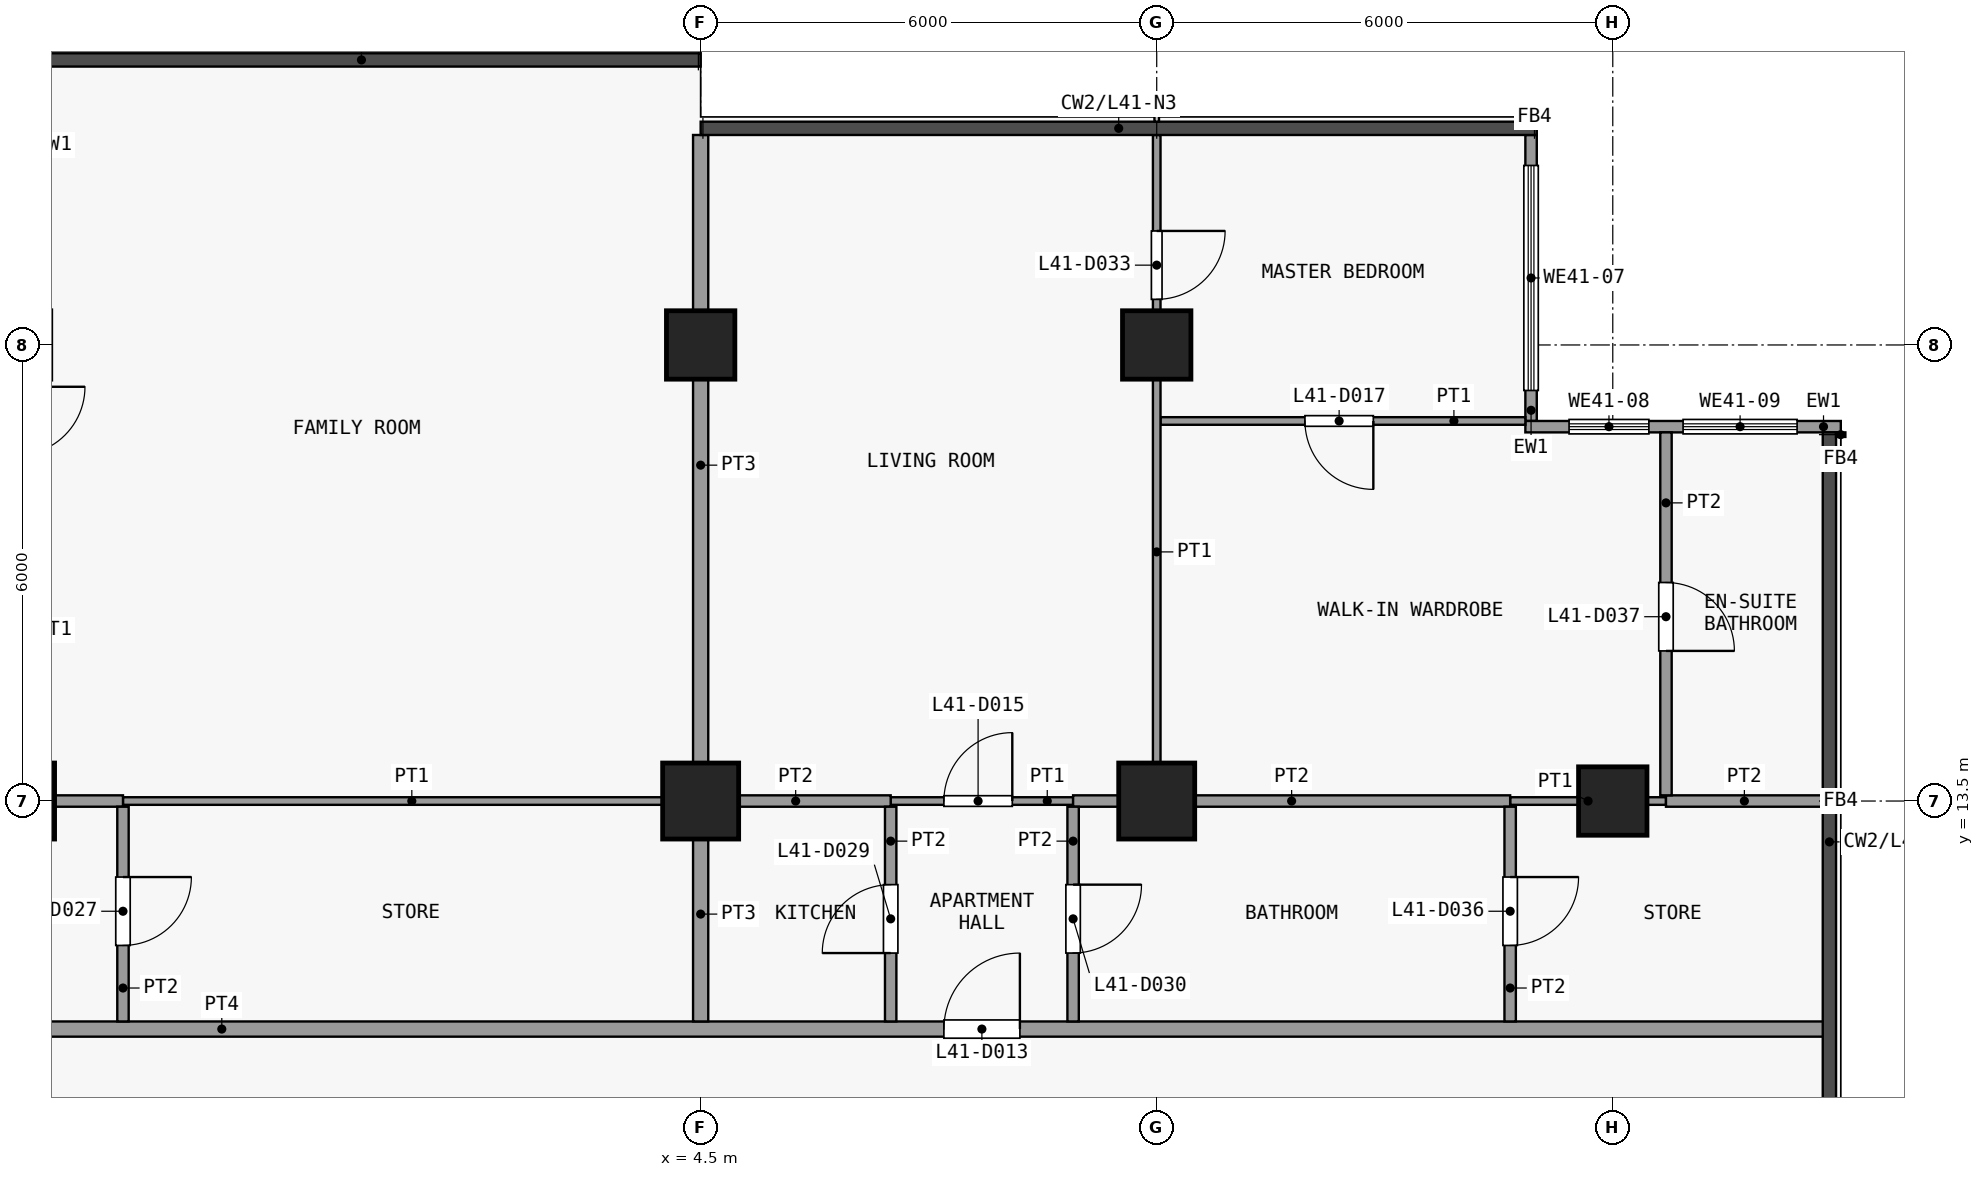
"""IFC4 building model, lengths in metres.
Left out: names, types, materials, properties, quantities, classifications, styles, units other than length and angle.
Written with IfcOpenShell. Run it as: python <this file> out.ifc"""

import sys

from ifc_helpers import new_model, si_unit, direction, frame, frame_2d, origin, origin_2d, place, context, subcontext, project, spatial, rectangle, extrude, element, fill, save


model = new_model("IFC4")
c1 = context("Model", 3, precision=1e-05, world=origin(), true_north=direction((0.0, 1.0)))
c2 = subcontext(c1, "Body", "Model", "MODEL_VIEW")
j1 = project(units=[si_unit("LENGTHUNIT", "METRE"), si_unit("PLANEANGLEUNIT", "RADIAN")], contexts=[c1])
p1 = place(None, origin())
s1 = spatial("IfcSite", under=j1, at=p1, CompositionType="ELEMENT")
p2 = place(p1, origin())
s2 = spatial("IfcBuilding", under=s1, at=p2, CompositionType="ELEMENT")
p3 = place(p2, frame((0.0, 0.0, 167.3)))
s3 = spatial("IfcBuildingStorey", under=s2, at=p3, CompositionType="ELEMENT", Elevation=167.3)
for number, where, z_axis, x_axis in (
    (1, (-4.5, 13.5, 0.0), (0.0, 0.0, 1.0), (1.0, 0.0, 0.0)),
    (2, (4.5, 13.5, 0.0), (0.0, 0.0, 1.0), (1.0, 0.0, 0.0)),
):
    element("IfcColumn", number, at=place(p3, frame(where, z_axis=z_axis, x_axis=x_axis)), inside=s3, PredefinedType="COLUMN", context=c2, shape_type="SweptSolid", body=[
        extrude(rectangle(XDim=1.0, YDim=1.0, at=origin_2d()), origin(), (0.0, 0.0, 1.0), 3.6),
    ])
p4 = place(p3, frame((4.5, 19.5, 0.0), z_axis=(0.0, 0.0, 1.0), x_axis=(1.0, 0.0, 0.0)))
e3 = element("IfcColumn", 3, at=p4, inside=s3, PredefinedType="COLUMN", context=c2, shape_type="SweptSolid", body=[
    extrude(rectangle(XDim=0.9, YDim=0.9, at=origin_2d()), origin(), (0.0, 0.0, 1.0), 3.6),
])
p5 = place(p3, frame((10.5, 13.5, 0.0), z_axis=(0.0, 0.0, 1.0), x_axis=(1.0, 0.0, 0.0)))
e4 = element("IfcColumn", 4, at=p5, inside=s3, PredefinedType="COLUMN", context=c2, shape_type="SweptSolid", body=[
    extrude(rectangle(XDim=1.0, YDim=1.0, at=origin_2d()), origin(), (0.0, 0.0, 1.0), 3.6),
])
for number, where, z_axis, x_axis in (
    (5, (10.5, 19.5, 0.0), (0.0, 0.0, 1.0), (1.0, 0.0, 0.0)),
    (6, (16.5, 13.5, 0.0), (0.0, 0.0, 1.0), (1.0, 0.0, 0.0)),
):
    element("IfcColumn", number, at=place(p3, frame(where, z_axis=z_axis, x_axis=x_axis)), inside=s3, PredefinedType="COLUMN", context=c2, shape_type="SweptSolid", body=[
        extrude(rectangle(XDim=0.9, YDim=0.9, at=origin_2d()), origin(), (0.0, 0.0, 1.0), 3.6),
    ])
p6 = place(p3, frame((15.425, 22.262, 0.0), z_axis=(0.0, 0.0, 1.0), x_axis=(0.0, -1.0, 0.0)))
e7 = element("IfcWall", 7, at=p6, inside=s3, PredefinedType="SOLIDWALL", context=c2, shape_type="SweptSolid", body=[
    extrude(rectangle(XDim=3.762, YDim=0.15, at=frame_2d((1.881, 0.0))), origin(), (0.0, 0.0, 1.0), 3.3),
])
p7 = place(p6, frame((0.401, 0.0, 0.9)))
e8 = element("IfcOpeningElement", 8, at=p7, cuts=e7, PredefinedType="OPENING", context=c2, shape_type="SweptSolid", body=[
    extrude(rectangle(XDim=2.96, YDim=2.4, at=frame_2d((1.48, 1.2))), frame((0.0, 0.085, 0.0), z_axis=(0.0, -1.0, 0.0), x_axis=(1.0, 0.0, 0.0)), (0.0, 0.0, 1.0), 0.17),
])
p8 = place(p3, frame((15.35, 18.425, 0.0), z_axis=(0.0, 0.0, 1.0), x_axis=(1.0, 0.0, 0.0)))
e9 = element("IfcWall", 9, at=p8, inside=s3, PredefinedType="SOLIDWALL", context=c2, shape_type="SweptSolid", body=[
    extrude(rectangle(XDim=4.15, YDim=0.15, at=frame_2d((2.075, 0.0))), origin(), (0.0, 0.0, 1.0), 3.3),
])
p9 = place(p8, frame((0.575, 0.0, 0.9)))
e10 = element("IfcOpeningElement", 10, at=p9, cuts=e9, PredefinedType="OPENING", context=c2, shape_type="SweptSolid", body=[
    extrude(rectangle(XDim=1.05, YDim=2.4, at=frame_2d((0.525, 1.2))), frame((0.0, 0.085, 0.0), z_axis=(0.0, -1.0, 0.0), x_axis=(1.0, 0.0, 0.0)), (0.0, 0.0, 1.0), 0.17),
])
p10 = place(p8, frame((2.075, 0.0, 0.9)))
e11 = element("IfcOpeningElement", 11, at=p10, cuts=e9, PredefinedType="OPENING", context=c2, shape_type="SweptSolid", body=[
    extrude(rectangle(XDim=1.5, YDim=2.4, at=frame_2d((0.75, 1.2))), frame((0.0, 0.085, 0.0), z_axis=(0.0, -1.0, 0.0), x_axis=(1.0, 0.0, 0.0)), (0.0, 0.0, 1.0), 0.17),
])
p11 = place(p3, frame((-17.85, 10.5, 0.0), z_axis=(0.0, 0.0, 1.0), x_axis=(1.0, 0.0, 0.0)))
e12 = element("IfcWall", 12, at=p11, inside=s3, PredefinedType="PARTITIONING", context=c2, shape_type="SweptSolid", body=[
    extrude(rectangle(XDim=37.2, YDim=0.2, at=frame_2d((18.6, 0.0))), origin(), (0.0, 0.0, 1.0), 3.3),
])
p12 = place(p11, frame((5.55, 0.0, 0.0)))
e13 = element("IfcOpeningElement", 13, at=p12, cuts=e12, PredefinedType="OPENING", context=c2, shape_type="SweptSolid", body=[
    extrude(rectangle(XDim=1.0, YDim=2.1, at=frame_2d((0.5, 1.05))), frame((0.0, 0.11, 0.0), z_axis=(0.0, -1.0, 0.0), x_axis=(1.0, 0.0, 0.0)), (0.0, 0.0, 1.0), 0.22),
])
p13 = place(p11, frame((25.55, 0.0, 0.0)))
e14 = element("IfcOpeningElement", 14, at=p13, cuts=e12, PredefinedType="OPENING", context=c2, shape_type="SweptSolid", body=[
    extrude(rectangle(XDim=1.0, YDim=2.1, at=frame_2d((0.5, 1.05))), frame((0.0, 0.11, 0.0), z_axis=(0.0, -1.0, 0.0), x_axis=(1.0, 0.0, 0.0)), (0.0, 0.0, 1.0), 0.22),
])
p14 = place(p3, frame((-3.1, 13.5, 0.0), z_axis=(0.0, 0.0, 1.0), x_axis=(1.0, 0.0, 0.0)))
e15 = element("IfcWall", 15, at=p14, inside=s3, PredefinedType="PARTITIONING", context=c2, shape_type="SweptSolid", body=[
    extrude(rectangle(XDim=7.6, YDim=0.1, at=frame_2d((3.8, 0.0))), origin(), (0.0, 0.0, 1.0), 3.3),
])
p15 = place(p3, frame((7.0, 13.5, 0.0), z_axis=(0.0, 0.0, 1.0), x_axis=(1.0, 0.0, 0.0)))
e16 = element("IfcWall", 16, at=p15, inside=s3, PredefinedType="PARTITIONING", context=c2, shape_type="SweptSolid", body=[
    extrude(rectangle(XDim=2.4, YDim=0.1, at=frame_2d((1.2, 0.0))), origin(), (0.0, 0.0, 1.0), 3.3),
])
p16 = place(p15, frame((0.7, 0.0, 0.0)))
e17 = element("IfcOpeningElement", 17, at=p16, cuts=e16, PredefinedType="OPENING", context=c2, shape_type="SweptSolid", body=[
    extrude(rectangle(XDim=0.9, YDim=2.1, at=frame_2d((0.45, 1.05))), frame((0.0, 0.06, 0.0), z_axis=(0.0, -1.0, 0.0), x_axis=(1.0, 0.0, 0.0)), (0.0, 0.0, 1.0), 0.12),
])
p17 = place(p3, frame((15.15, 13.5, 0.0), z_axis=(0.0, 0.0, 1.0), x_axis=(1.0, 0.0, 0.0)))
e18 = element("IfcWall", 18, at=p17, inside=s3, PredefinedType="PARTITIONING", context=c2, shape_type="SweptSolid", body=[
    extrude(rectangle(XDim=2.05, YDim=0.1, at=frame_2d((1.025, 0.0))), origin(), (0.0, 0.0, 1.0), 3.3),
])
p18 = place(p3, frame((-10.5, 13.5, 0.0), z_axis=(0.0, 0.0, 1.0), x_axis=(1.0, 0.0, 0.0)))
e19 = element("IfcWall", 19, at=p18, inside=s3, PredefinedType="PARTITIONING", context=c2, shape_type="SweptSolid", body=[
    extrude(rectangle(XDim=7.4, YDim=0.15, at=frame_2d((3.7, 0.0))), origin(), (0.0, 0.0, 1.0), 3.3),
])
p19 = place(p3, frame((4.5, 13.5, 0.0), z_axis=(0.0, 0.0, 1.0), x_axis=(1.0, 0.0, 0.0)))
e20 = element("IfcWall", 20, at=p19, inside=s3, PredefinedType="PARTITIONING", context=c2, shape_type="SweptSolid", body=[
    extrude(rectangle(XDim=2.5, YDim=0.15, at=frame_2d((1.25, 0.0))), origin(), (0.0, 0.0, 1.0), 3.3),
])
p20 = place(p3, frame((9.4, 13.5, 0.0), z_axis=(0.0, 0.0, 1.0), x_axis=(1.0, 0.0, 0.0)))
e21 = element("IfcWall", 21, at=p20, inside=s3, PredefinedType="PARTITIONING", context=c2, shape_type="SweptSolid", body=[
    extrude(rectangle(XDim=5.75, YDim=0.15, at=frame_2d((2.875, 0.0))), origin(), (0.0, 0.0, 1.0), 3.3),
])
p21 = place(p3, frame((17.2, 13.5, 0.0), z_axis=(0.0, 0.0, 1.0), x_axis=(1.0, 0.0, 0.0)))
e22 = element("IfcWall", 22, at=p21, inside=s3, PredefinedType="PARTITIONING", context=c2, shape_type="SweptSolid", body=[
    extrude(rectangle(XDim=2.062, YDim=0.15, at=frame_2d((1.031, 0.0))), origin(), (0.0, 0.0, 1.0), 3.3),
])
p22 = place(p3, frame((10.55, 18.5, 0.0), z_axis=(0.0, 0.0, 1.0), x_axis=(1.0, 0.0, 0.0)))
e23 = element("IfcWall", 23, at=p22, inside=s3, PredefinedType="PARTITIONING", context=c2, shape_type="SweptSolid", body=[
    extrude(rectangle(XDim=4.8, YDim=0.1, at=frame_2d((2.4, 0.0))), origin(), (0.0, 0.0, 1.0), 3.3),
])
p23 = place(p22, frame((1.9, 0.0, 0.0)))
e24 = element("IfcOpeningElement", 24, at=p23, cuts=e23, PredefinedType="OPENING", context=c2, shape_type="SweptSolid", body=[
    extrude(rectangle(XDim=0.9, YDim=2.1, at=frame_2d((0.45, 1.05))), frame((0.0, 0.06, 0.0), z_axis=(0.0, -1.0, 0.0), x_axis=(1.0, 0.0, 0.0)), (0.0, 0.0, 1.0), 0.12),
])
p24 = place(p3, frame((-3.1, 10.6, 0.0), z_axis=(0.0, 0.0, 1.0), x_axis=(0.0, 1.0, 0.0)))
e25 = element("IfcWall", 25, at=p24, inside=s3, PredefinedType="PARTITIONING", context=c2, shape_type="SweptSolid", body=[
    extrude(rectangle(XDim=2.825, YDim=0.15, at=frame_2d((1.413, 0.0))), origin(), (0.0, 0.0, 1.0), 3.3),
])
p25 = place(p24, frame((1.0, 0.0, 0.0)))
e26 = element("IfcOpeningElement", 26, at=p25, cuts=e25, PredefinedType="OPENING", context=c2, shape_type="SweptSolid", body=[
    extrude(rectangle(XDim=0.9, YDim=2.1, at=frame_2d((0.45, 1.05))), frame((0.0, 0.085, 0.0), z_axis=(0.0, -1.0, 0.0), x_axis=(1.0, 0.0, 0.0)), (0.0, 0.0, 1.0), 0.17),
])
p26 = place(p3, frame((4.5, 10.6, 0.0), z_axis=(0.0, 0.0, 1.0), x_axis=(0.0, 1.0, 0.0)))
e27 = element("IfcWall", 27, at=p26, inside=s3, PredefinedType="PARTITIONING", context=c2, shape_type="SweptSolid", body=[
    extrude(rectangle(XDim=2.825, YDim=0.2, at=frame_2d((1.413, 0.0))), origin(), (0.0, 0.0, 1.0), 3.3),
])
p27 = place(p3, frame((4.5, 13.575, 0.0), z_axis=(0.0, 0.0, 1.0), x_axis=(0.0, 1.0, 0.0)))
e28 = element("IfcWall", 28, at=p27, inside=s3, PredefinedType="PARTITIONING", context=c2, shape_type="SweptSolid", body=[
    extrude(rectangle(XDim=8.688, YDim=0.2, at=frame_2d((4.344, 0.0))), origin(), (0.0, 0.0, 1.0), 3.3),
])
p28 = place(p3, frame((7.0, 10.6, 0.0), z_axis=(0.0, 0.0, 1.0), x_axis=(0.0, 1.0, 0.0)))
e29 = element("IfcWall", 29, at=p28, inside=s3, PredefinedType="PARTITIONING", context=c2, shape_type="SweptSolid", body=[
    extrude(rectangle(XDim=2.825, YDim=0.15, at=frame_2d((1.413, 0.0))), origin(), (0.0, 0.0, 1.0), 3.3),
])
p29 = place(p28, frame((0.9, 0.0, 0.0)))
e30 = element("IfcOpeningElement", 30, at=p29, cuts=e29, PredefinedType="OPENING", context=c2, shape_type="SweptSolid", body=[
    extrude(rectangle(XDim=0.9, YDim=2.1, at=frame_2d((0.45, 1.05))), frame((0.0, 0.085, 0.0), z_axis=(0.0, -1.0, 0.0), x_axis=(1.0, 0.0, 0.0)), (0.0, 0.0, 1.0), 0.17),
])
p30 = place(p3, frame((9.4, 10.6, 0.0), z_axis=(0.0, 0.0, 1.0), x_axis=(0.0, 1.0, 0.0)))
e31 = element("IfcWall", 31, at=p30, inside=s3, PredefinedType="PARTITIONING", context=c2, shape_type="SweptSolid", body=[
    extrude(rectangle(XDim=2.825, YDim=0.15, at=frame_2d((1.413, 0.0))), origin(), (0.0, 0.0, 1.0), 3.3),
])
p31 = place(p30, frame((0.9, 0.0, 0.0)))
e32 = element("IfcOpeningElement", 32, at=p31, cuts=e31, PredefinedType="OPENING", context=c2, shape_type="SweptSolid", body=[
    extrude(rectangle(XDim=0.9, YDim=2.1, at=frame_2d((0.45, 1.05))), frame((0.0, 0.085, 0.0), z_axis=(0.0, -1.0, 0.0), x_axis=(1.0, 0.0, 0.0)), (0.0, 0.0, 1.0), 0.17),
])
p32 = place(p3, frame((10.5, 13.575, 0.0), z_axis=(0.0, 0.0, 1.0), x_axis=(0.0, 1.0, 0.0)))
e33 = element("IfcWall", 33, at=p32, inside=s3, PredefinedType="PARTITIONING", context=c2, shape_type="SweptSolid", body=[
    extrude(rectangle(XDim=8.688, YDim=0.1, at=frame_2d((4.344, 0.0))), origin(), (0.0, 0.0, 1.0), 3.3),
])
p33 = place(p32, frame((6.525, 0.0, 0.0)))
e34 = element("IfcOpeningElement", 34, at=p33, cuts=e33, PredefinedType="OPENING", context=c2, shape_type="SweptSolid", body=[
    extrude(rectangle(XDim=0.9, YDim=2.1, at=frame_2d((0.45, 1.05))), frame((0.0, 0.06, 0.0), z_axis=(0.0, -1.0, 0.0), x_axis=(1.0, 0.0, 0.0)), (0.0, 0.0, 1.0), 0.12),
])
p34 = place(p3, frame((15.15, 10.6, 0.0), z_axis=(0.0, 0.0, 1.0), x_axis=(0.0, 1.0, 0.0)))
e35 = element("IfcWall", 35, at=p34, inside=s3, PredefinedType="PARTITIONING", context=c2, shape_type="SweptSolid", body=[
    extrude(rectangle(XDim=2.825, YDim=0.15, at=frame_2d((1.413, 0.0))), origin(), (0.0, 0.0, 1.0), 3.3),
])
p35 = place(p34, frame((1.0, 0.0, 0.0)))
e36 = element("IfcOpeningElement", 36, at=p35, cuts=e35, PredefinedType="OPENING", context=c2, shape_type="SweptSolid", body=[
    extrude(rectangle(XDim=0.9, YDim=2.1, at=frame_2d((0.45, 1.05))), frame((0.0, 0.085, 0.0), z_axis=(0.0, -1.0, 0.0), x_axis=(1.0, 0.0, 0.0)), (0.0, 0.0, 1.0), 0.17),
])
p36 = place(p3, frame((17.2, 13.575, 0.0), z_axis=(0.0, 0.0, 1.0), x_axis=(0.0, 1.0, 0.0)))
e37 = element("IfcWall", 37, at=p36, inside=s3, PredefinedType="PARTITIONING", context=c2, shape_type="SweptSolid", body=[
    extrude(rectangle(XDim=4.775, YDim=0.15, at=frame_2d((2.388, 0.0))), origin(), (0.0, 0.0, 1.0), 3.3),
])
p37 = place(p36, frame((1.9, 0.0, 0.0)))
e38 = element("IfcOpeningElement", 38, at=p37, cuts=e37, PredefinedType="OPENING", context=c2, shape_type="SweptSolid", body=[
    extrude(rectangle(XDim=0.9, YDim=2.1, at=frame_2d((0.45, 1.05))), frame((0.0, 0.085, 0.0), z_axis=(0.0, -1.0, 0.0), x_axis=(1.0, 0.0, 0.0)), (0.0, 0.0, 1.0), 0.17),
])
p38 = place(p7, origin())
e39 = element("IfcWindow", 39, at=p38, inside=s3, PartitioningType="SINGLE_PANEL", PredefinedType="WINDOW", context=c2, shape_type="SweptSolid", body=[
    extrude(rectangle(XDim=2.96, YDim=2.4, at=frame_2d((1.48, 1.2))), frame((0.0, 0.03, 0.0), z_axis=(0.0, -1.0, 0.0), x_axis=(1.0, 0.0, 0.0)), (0.0, 0.0, 1.0), 0.06),
])
fill(e8, e39)
p39 = place(p9, origin())
e40 = element("IfcWindow", 40, at=p39, inside=s3, PartitioningType="SINGLE_PANEL", PredefinedType="WINDOW", context=c2, shape_type="SweptSolid", body=[
    extrude(rectangle(XDim=1.05, YDim=2.4, at=frame_2d((0.525, 1.2))), frame((0.0, 0.03, 0.0), z_axis=(0.0, -1.0, 0.0), x_axis=(1.0, 0.0, 0.0)), (0.0, 0.0, 1.0), 0.06),
])
fill(e10, e40)
p40 = place(p10, origin())
e41 = element("IfcWindow", 41, at=p40, inside=s3, PartitioningType="SINGLE_PANEL", PredefinedType="WINDOW", context=c2, shape_type="SweptSolid", body=[
    extrude(rectangle(XDim=1.5, YDim=2.4, at=frame_2d((0.75, 1.2))), frame((0.0, 0.03, 0.0), z_axis=(0.0, -1.0, 0.0), x_axis=(1.0, 0.0, 0.0)), (0.0, 0.0, 1.0), 0.06),
])
fill(e11, e41)
p41 = place(p13, origin())
e42 = element("IfcDoor", 42, at=p41, inside=s3, OperationType="SINGLE_SWING_LEFT", PredefinedType="DOOR", context=c2, shape_type="SweptSolid", body=[
    extrude(rectangle(XDim=1.0, YDim=2.1, at=frame_2d((0.5, 1.05))), frame((0.0, 0.025, 0.0), z_axis=(0.0, -1.0, 0.0), x_axis=(1.0, 0.0, 0.0)), (0.0, 0.0, 1.0), 0.05),
])
fill(e14, e42)
p42 = place(p16, origin())
e43 = element("IfcDoor", 43, at=p42, inside=s3, OperationType="SINGLE_SWING_LEFT", PredefinedType="DOOR", context=c2, shape_type="SweptSolid", body=[
    extrude(rectangle(XDim=0.9, YDim=2.1, at=frame_2d((0.45, 1.05))), frame((0.0, 0.025, 0.0), z_axis=(0.0, -1.0, 0.0), x_axis=(1.0, 0.0, 0.0)), (0.0, 0.0, 1.0), 0.05),
])
fill(e17, e43)
p43 = place(p23, origin())
e44 = element("IfcDoor", 44, at=p43, inside=s3, OperationType="SINGLE_SWING_RIGHT", PredefinedType="DOOR", context=c2, shape_type="SweptSolid", body=[
    extrude(rectangle(XDim=0.9, YDim=2.1, at=frame_2d((0.45, 1.05))), frame((0.0, 0.025, 0.0), z_axis=(0.0, -1.0, 0.0), x_axis=(1.0, 0.0, 0.0)), (0.0, 0.0, 1.0), 0.05),
])
fill(e24, e44)
p44 = place(p25, origin())
e45 = element("IfcDoor", 45, at=p44, inside=s3, OperationType="SINGLE_SWING_RIGHT", PredefinedType="DOOR", context=c2, shape_type="SweptSolid", body=[
    extrude(rectangle(XDim=0.9, YDim=2.1, at=frame_2d((0.45, 1.05))), frame((0.0, 0.025, 0.0), z_axis=(0.0, -1.0, 0.0), x_axis=(1.0, 0.0, 0.0)), (0.0, 0.0, 1.0), 0.05),
])
fill(e26, e45)
p45 = place(p29, origin())
e46 = element("IfcDoor", 46, at=p45, inside=s3, OperationType="SINGLE_SWING_RIGHT", PredefinedType="DOOR", context=c2, shape_type="SweptSolid", body=[
    extrude(rectangle(XDim=0.9, YDim=2.1, at=frame_2d((0.45, 1.05))), frame((0.0, 0.025, 0.0), z_axis=(0.0, -1.0, 0.0), x_axis=(1.0, 0.0, 0.0)), (0.0, 0.0, 1.0), 0.05),
])
fill(e30, e46)
p46 = place(p31, origin())
e47 = element("IfcDoor", 47, at=p46, inside=s3, OperationType="SINGLE_SWING_RIGHT", PredefinedType="DOOR", context=c2, shape_type="SweptSolid", body=[
    extrude(rectangle(XDim=0.9, YDim=2.1, at=frame_2d((0.45, 1.05))), frame((0.0, 0.025, 0.0), z_axis=(0.0, -1.0, 0.0), x_axis=(1.0, 0.0, 0.0)), (0.0, 0.0, 1.0), 0.05),
])
fill(e32, e47)
p47 = place(p33, origin())
e48 = element("IfcDoor", 48, at=p47, inside=s3, OperationType="SINGLE_SWING_RIGHT", PredefinedType="DOOR", context=c2, shape_type="SweptSolid", body=[
    extrude(rectangle(XDim=0.9, YDim=2.1, at=frame_2d((0.45, 1.05))), frame((0.0, 0.025, 0.0), z_axis=(0.0, -1.0, 0.0), x_axis=(1.0, 0.0, 0.0)), (0.0, 0.0, 1.0), 0.05),
])
fill(e34, e48)
p48 = place(p35, origin())
e49 = element("IfcDoor", 49, at=p48, inside=s3, OperationType="SINGLE_SWING_RIGHT", PredefinedType="DOOR", context=c2, shape_type="SweptSolid", body=[
    extrude(rectangle(XDim=0.9, YDim=2.1, at=frame_2d((0.45, 1.05))), frame((0.0, 0.025, 0.0), z_axis=(0.0, -1.0, 0.0), x_axis=(1.0, 0.0, 0.0)), (0.0, 0.0, 1.0), 0.05),
])
fill(e36, e49)
p49 = place(p37, origin())
e50 = element("IfcDoor", 50, at=p49, inside=s3, OperationType="SINGLE_SWING_LEFT", PredefinedType="DOOR", context=c2, shape_type="SweptSolid", body=[
    extrude(rectangle(XDim=0.9, YDim=2.1, at=frame_2d((0.45, 1.05))), frame((0.0, 0.025, 0.0), z_axis=(0.0, -1.0, 0.0), x_axis=(1.0, 0.0, 0.0)), (0.0, 0.0, 1.0), 0.05),
])
fill(e38, e50)
save(model, sys.argv[1])
